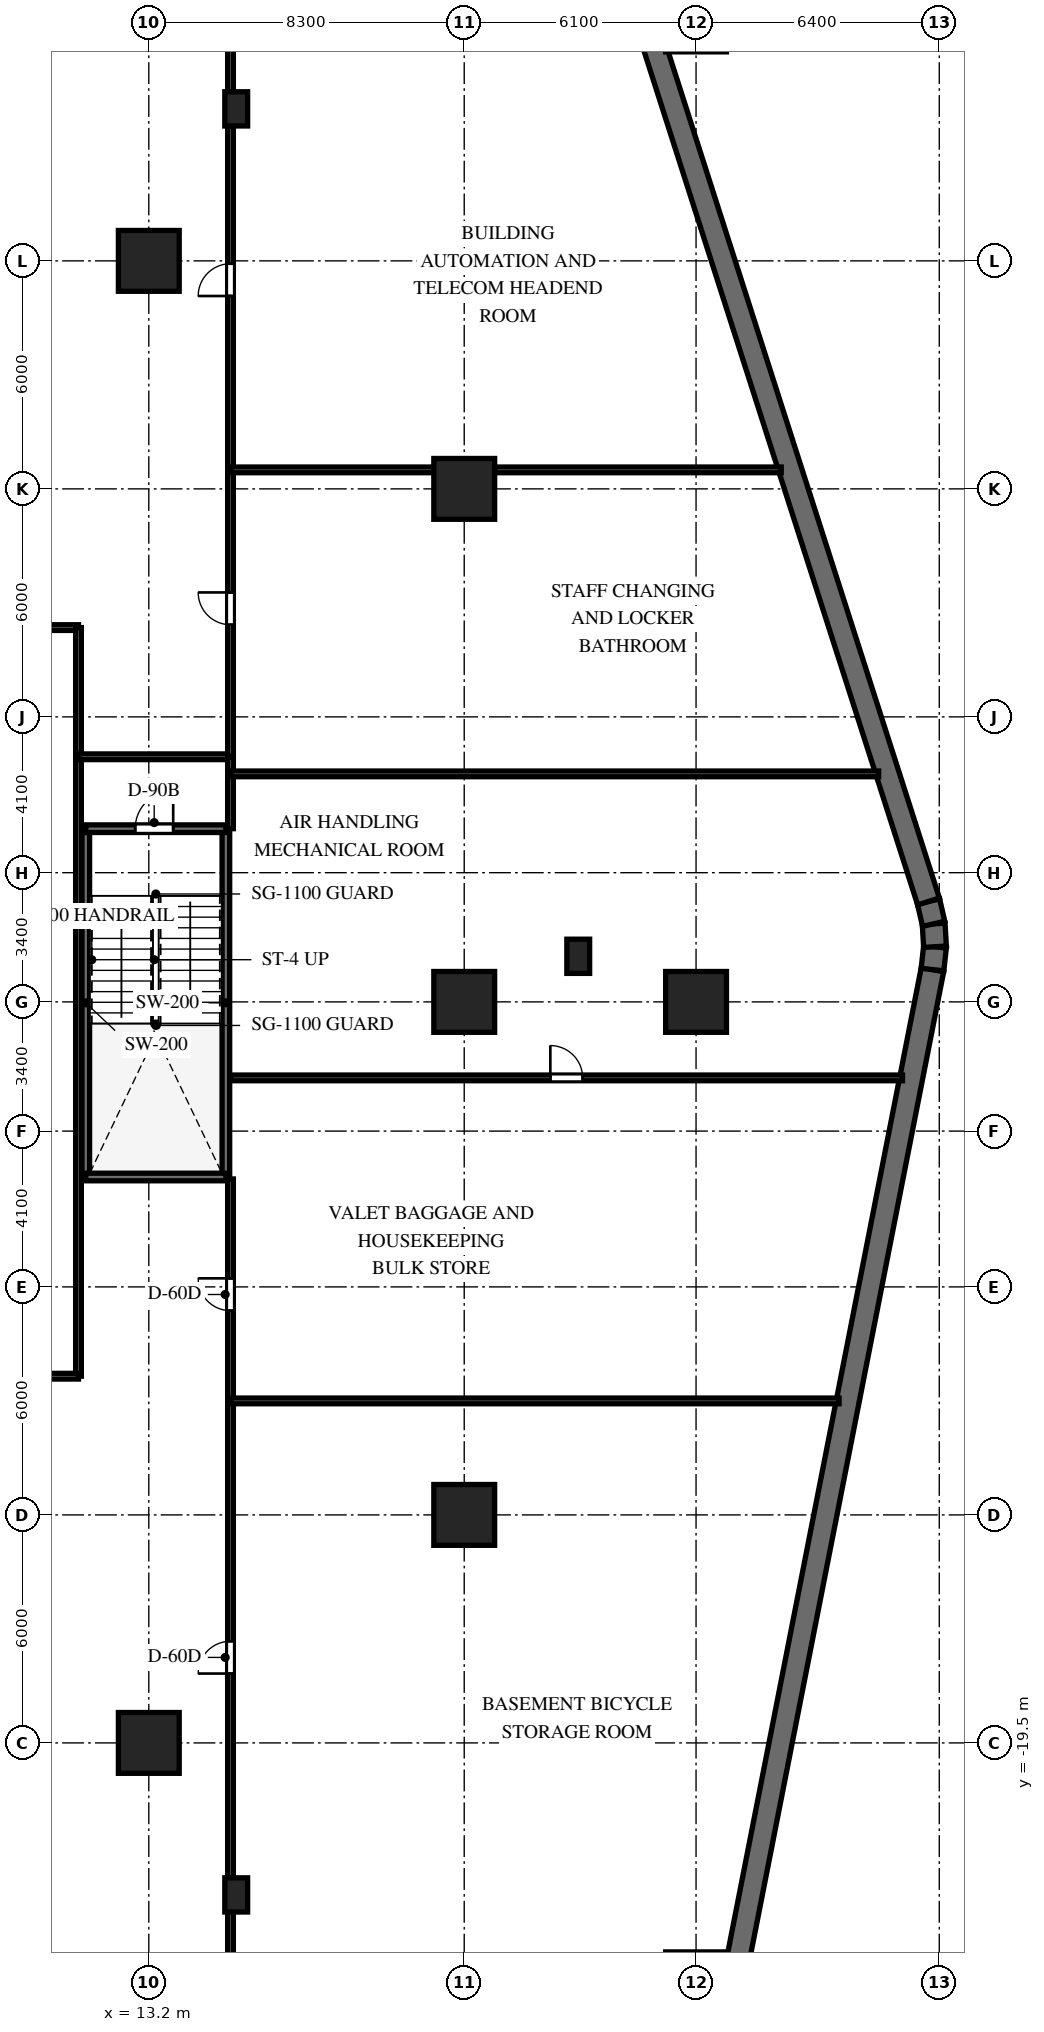
"""IFC4 building model, lengths in metres.
Left out: names, types, materials, properties, quantities, classifications, styles, units other than length and angle.
Written with IfcOpenShell. Run it as: python <this file> out.ifc"""

import sys

from ifc_helpers import new_model, si_unit, direction, frame, frame_2d, origin, origin_2d, place, context, subcontext, project, spatial, rectangle, extrude, element, fill, save


model = new_model("IFC4")
c1 = context("Model", 3, precision=1e-05, world=origin(), true_north=direction((0.0, 1.0)))
c2 = subcontext(c1, "Body", "Model", "MODEL_VIEW")
j1 = project(units=[si_unit("LENGTHUNIT", "METRE"), si_unit("PLANEANGLEUNIT", "RADIAN")], contexts=[c1])
p1 = place(None, origin())
s1 = spatial("IfcSite", under=j1, at=p1, CompositionType="ELEMENT")
p2 = place(p1, origin())
s2 = spatial("IfcBuilding", under=s1, at=p2, CompositionType="ELEMENT")
p3 = place(p2, frame((0.0, 0.0, -4.5)))
s3 = spatial("IfcBuildingStorey", under=s2, at=p3, CompositionType="ELEMENT", Elevation=-4.5)
for number, where, z_axis, x_axis in (
    (1, (11.542, -4.608, 0.0), (0.0, 0.0, 1.0), (0.0, 1.0, 0.0)),
    (2, (15.228, -4.608, 0.0), (0.0, 0.0, 1.0), (0.0, 1.0, 0.0)),
):
    element("IfcWall", number, at=place(p3, frame(where, z_axis=z_axis, x_axis=x_axis)), inside=s3, PredefinedType="SHEAR", context=c2, shape_type="SweptSolid", body=[
        extrude(rectangle(XDim=9.166, YDim=0.2, at=frame_2d((4.583, 0.0))), origin(), (0.0, 0.0, 1.0), 4.5),
    ])
p4 = place(p3, frame((11.542, -4.608, 0.0), z_axis=(0.0, 0.0, 1.0), x_axis=(1.0, 0.0, 0.0)))
e3 = element("IfcWall", 3, at=p4, inside=s3, PredefinedType="SHEAR", context=c2, shape_type="SweptSolid", body=[
    extrude(rectangle(XDim=3.686, YDim=0.2, at=frame_2d((1.843, 0.0))), origin(), (0.0, 0.0, 1.0), 4.5),
])
p5 = place(p3, frame((11.542, 4.558, 0.0), z_axis=(0.0, 0.0, 1.0), x_axis=(1.0, 0.0, 0.0)))
e4 = element("IfcWall", 4, at=p5, inside=s3, PredefinedType="SHEAR", context=c2, shape_type="SweptSolid", body=[
    extrude(rectangle(XDim=3.686, YDim=0.2, at=frame_2d((1.843, 0.0))), origin(), (0.0, 0.0, 1.0), 4.5),
])
p6 = place(p5, frame((1.3, 0.0, 0.0)))
e5 = element("IfcOpeningElement", 5, at=p6, cuts=e4, PredefinedType="OPENING", context=c2, shape_type="SweptSolid", body=[
    extrude(rectangle(XDim=1.0, YDim=2.15, at=frame_2d((0.5, 1.075))), frame((0.0, 0.11, 0.0), z_axis=(0.0, -1.0, 0.0), x_axis=(1.0, 0.0, 0.0)), (0.0, 0.0, 1.0), 0.22),
])
p7 = place(p3, frame((27.941, -29.094, 0.0), z_axis=(0.0, 0.0, 1.0), x_axis=(0.192705549984, 0.981256628515, 0.0)))
e6 = element("IfcWall", 6, at=p7, inside=s3, PredefinedType="SHEAR", context=c2, shape_type="SweptSolid", body=[
    extrude(rectangle(XDim=30.516, YDim=0.6, at=frame_2d((15.258, 0.0))), origin(), (0.0, 0.0, 1.0), 4.5),
])
p8 = place(p3, frame((33.821, 0.85, 0.0), z_axis=(0.0, 0.0, 1.0), x_axis=(0.109899357688, 0.993942720271, 0.0)))
e7 = element("IfcWall", 7, at=p8, inside=s3, PredefinedType="SHEAR", context=c2, shape_type="SweptSolid", body=[
    extrude(rectangle(XDim=0.604, YDim=0.6, at=frame_2d((0.302, 0.0))), origin(), (0.0, 0.0, 1.0), 4.5),
])
for number, where, z_axis, x_axis in (
    (8, (33.888, 1.451, 0.0), (0.0, 0.0, 1.0), (-0.058, 0.998, 0.0)),
    (9, (33.853, 2.054, 0.0), (0.0, 0.0, 1.0), (-0.224, 0.975, 0.0)),
):
    element("IfcWall", number, at=place(p3, frame(where, z_axis=z_axis, x_axis=x_axis)), inside=s3, PredefinedType="SHEAR", context=c2, shape_type="SweptSolid", body=[
        extrude(rectangle(XDim=0.604, YDim=0.6, at=frame_2d((0.302, 0.0))), origin(), (0.0, 0.0, 1.0), 4.5),
    ])
p9 = place(p3, frame((33.717, 2.643, 0.0), z_axis=(0.0, 0.0, 1.0), x_axis=(-0.305147622554, 0.952305060603, 0.0)))
e10 = element("IfcWall", 10, at=p9, inside=s3, PredefinedType="SHEAR", context=c2, shape_type="SweptSolid", body=[
    extrude(rectangle(XDim=28.201, YDim=0.6, at=frame_2d((14.101, 0.0))), origin(), (0.0, 0.0, 1.0), 4.5),
])
for number, where, z_axis, x_axis in (
    (11, (21.5, -13.5, 0.0), (0.0, 0.0, 1.0), (1.0, 0.0, 0.0)),
    (12, (21.5, 0.0, 0.0), (0.0, 0.0, 1.0), (1.0, 0.0, 0.0)),
    (13, (21.5, 13.5, 0.0), (0.0, 0.0, 1.0), (1.0, 0.0, 0.0)),
    (14, (13.2, -19.5, 0.0), (0.0, 0.0, 1.0), (1.0, 0.0, 0.0)),
    (15, (13.2, 19.5, 0.0), (0.0, 0.0, 1.0), (1.0, 0.0, 0.0)),
    (16, (27.6, 0.0, 0.0), (0.0, 0.0, 1.0), (1.0, 0.0, 0.0)),
):
    element("IfcColumn", number, at=place(p3, frame(where, z_axis=z_axis, x_axis=x_axis)), inside=s3, PredefinedType="COLUMN", context=c2, shape_type="SweptSolid", body=[
        extrude(rectangle(XDim=1.6, YDim=1.6, at=origin_2d()), origin(), (0.0, 0.0, 1.0), 4.5),
    ])
for number, where, z_axis, x_axis in (
    (17, (15.5, -23.5, 0.0), (0.0, 0.0, 1.0), (1.0, 0.0, 0.0)),
    (18, (24.5, 1.2, 0.0), (0.0, 0.0, 1.0), (1.0, 0.0, 0.0)),
    (19, (15.5, 23.5, 0.0), (0.0, 0.0, 1.0), (1.0, 0.0, 0.0)),
):
    element("IfcColumn", number, at=place(p3, frame(where, z_axis=z_axis, x_axis=x_axis)), inside=s3, PredefinedType="PILASTER", context=c2, shape_type="SweptSolid", body=[
        extrude(rectangle(XDim=0.6, YDim=0.9, at=origin_2d()), origin(), (0.0, 0.0, 1.0), 4.5),
    ])
p10 = place(p3, frame((-11.35, 9.85, 0.0), z_axis=(0.0, 0.0, 1.0), x_axis=(1.0, 0.0, 0.0)))
e20 = element("IfcWall", 20, at=p10, inside=s3, PredefinedType="PARTITIONING", context=c2, shape_type="SweptSolid", body=[
    extrude(rectangle(XDim=22.7, YDim=0.15, at=frame_2d((11.35, 0.0))), origin(), (0.0, 0.0, 1.0), 3.17),
])
p11 = place(p3, frame((11.35, 9.85, 0.0), z_axis=(0.0, 0.0, 1.0), x_axis=(0.0, -1.0, 0.0)))
e21 = element("IfcWall", 21, at=p11, inside=s3, PredefinedType="PARTITIONING", context=c2, shape_type="SweptSolid", body=[
    extrude(rectangle(XDim=19.7, YDim=0.15, at=frame_2d((9.85, 0.0))), origin(), (0.0, 0.0, 1.0), 3.17),
])
p12 = place(p3, frame((11.35, -9.85, 0.0), z_axis=(0.0, 0.0, 1.0), x_axis=(-1.0, 0.0, 0.0)))
e22 = element("IfcWall", 22, at=p12, inside=s3, PredefinedType="PARTITIONING", context=c2, shape_type="SweptSolid", body=[
    extrude(rectangle(XDim=22.7, YDim=0.15, at=frame_2d((11.35, 0.0))), origin(), (0.0, 0.0, 1.0), 3.17),
])
p13 = place(p3, frame((11.35, 6.45, 0.0), z_axis=(0.0, 0.0, 1.0), x_axis=(1.0, 0.0, 0.0)))
e23 = element("IfcWall", 23, at=p13, inside=s3, PredefinedType="PARTITIONING", context=c2, shape_type="SweptSolid", body=[
    extrude(rectangle(XDim=4.0, YDim=0.15, at=frame_2d((2.0, 0.0))), origin(), (0.0, 0.0, 1.0), 4.18),
])
p14 = place(p3, frame((15.35, 4.558, 0.0), z_axis=(0.0, 0.0, 1.0), x_axis=(0.0, 1.0, 0.0)))
e24 = element("IfcWall", 24, at=p14, inside=s3, PredefinedType="PARTITIONING", context=c2, shape_type="SweptSolid", body=[
    extrude(rectangle(XDim=1.892, YDim=0.15, at=frame_2d((0.946, 0.0))), origin(), (0.0, 0.0, 1.0), 4.18),
])
p15 = place(p3, frame((15.35, -25.5, 0.0), z_axis=(0.0, 0.0, 1.0), x_axis=(0.0, 1.0, 0.0)))
e25 = element("IfcWall", 25, at=p15, inside=s3, PredefinedType="PARTITIONING", context=c2, shape_type="SweptSolid", body=[
    extrude(rectangle(XDim=20.84, YDim=0.15, at=frame_2d((10.42, 0.0))), origin(), (0.0, 0.0, 1.0), 3.17),
])
p16 = place(p15, frame((7.825, 0.0, 0.0)))
e26 = element("IfcOpeningElement", 26, at=p16, cuts=e25, PredefinedType="OPENING", context=c2, shape_type="SweptSolid", body=[
    extrude(rectangle(XDim=0.85, YDim=2.03, at=frame_2d((0.425, 1.015))), frame((0.0, 0.085, 0.0), z_axis=(0.0, -1.0, 0.0), x_axis=(1.0, 0.0, 0.0)), (0.0, 0.0, 1.0), 0.17),
])
p17 = place(p15, frame((17.375, 0.0, 0.0)))
e27 = element("IfcOpeningElement", 27, at=p17, cuts=e25, PredefinedType="OPENING", context=c2, shape_type="SweptSolid", body=[
    extrude(rectangle(XDim=0.85, YDim=2.03, at=frame_2d((0.425, 1.015))), frame((0.0, 0.085, 0.0), z_axis=(0.0, -1.0, 0.0), x_axis=(1.0, 0.0, 0.0)), (0.0, 0.0, 1.0), 0.17),
])
p18 = place(p3, frame((15.35, 6.46, 0.0), z_axis=(0.0, 0.0, 1.0), x_axis=(0.0, 1.0, 0.0)))
e28 = element("IfcWall", 28, at=p18, inside=s3, PredefinedType="PARTITIONING", context=c2, shape_type="SweptSolid", body=[
    extrude(rectangle(XDim=19.04, YDim=0.15, at=frame_2d((9.52, 0.0))), origin(), (0.0, 0.0, 1.0), 3.17),
])
p19 = place(p18, frame((3.465, 0.0, 0.0)))
e29 = element("IfcOpeningElement", 29, at=p19, cuts=e28, PredefinedType="OPENING", context=c2, shape_type="SweptSolid", body=[
    extrude(rectangle(XDim=0.85, YDim=2.03, at=frame_2d((0.425, 1.015))), frame((0.0, 0.085, 0.0), z_axis=(0.0, -1.0, 0.0), x_axis=(1.0, 0.0, 0.0)), (0.0, 0.0, 1.0), 0.17),
])
p20 = place(p18, frame((12.115, 0.0, 0.0)))
e30 = element("IfcOpeningElement", 30, at=p20, cuts=e28, PredefinedType="OPENING", context=c2, shape_type="SweptSolid", body=[
    extrude(rectangle(XDim=0.85, YDim=2.03, at=frame_2d((0.425, 1.015))), frame((0.0, 0.085, 0.0), z_axis=(0.0, -1.0, 0.0), x_axis=(1.0, 0.0, 0.0)), (0.0, 0.0, 1.0), 0.17),
])
p21 = place(p3, frame((15.35, -10.5, 0.0), z_axis=(0.0, 0.0, 1.0), x_axis=(1.0, 0.0, 0.0)))
e31 = element("IfcWall", 31, at=p21, inside=s3, PredefinedType="PARTITIONING", context=c2, shape_type="SweptSolid", body=[
    extrude(rectangle(XDim=16.013, YDim=0.15, at=frame_2d((8.006, 0.0))), origin(), (0.0, 0.0, 1.0), 3.17),
])
p22 = place(p3, frame((15.35, -2.0, 0.0), z_axis=(0.0, 0.0, 1.0), x_axis=(1.0, 0.0, 0.0)))
e32 = element("IfcWall", 32, at=p22, inside=s3, PredefinedType="PARTITIONING", context=c2, shape_type="SweptSolid", body=[
    extrude(rectangle(XDim=17.682, YDim=0.15, at=frame_2d((8.841, 0.0))), origin(), (0.0, 0.0, 1.0), 3.17),
])
p23 = place(p22, frame((8.416, 0.0, 0.0)))
e33 = element("IfcOpeningElement", 33, at=p23, cuts=e32, PredefinedType="OPENING", context=c2, shape_type="SweptSolid", body=[
    extrude(rectangle(XDim=0.85, YDim=2.03, at=frame_2d((0.425, 1.015))), frame((0.0, 0.085, 0.0), z_axis=(0.0, -1.0, 0.0), x_axis=(1.0, 0.0, 0.0)), (0.0, 0.0, 1.0), 0.17),
])
p24 = place(p3, frame((15.35, 6.0, 0.0), z_axis=(0.0, 0.0, 1.0), x_axis=(1.0, 0.0, 0.0)))
e34 = element("IfcWall", 34, at=p24, inside=s3, PredefinedType="PARTITIONING", context=c2, shape_type="SweptSolid", body=[
    extrude(rectangle(XDim=17.055, YDim=0.15, at=frame_2d((8.527, 0.0))), origin(), (0.0, 0.0, 1.0), 3.17),
])
p25 = place(p3, frame((15.35, 14.0, 0.0), z_axis=(0.0, 0.0, 1.0), x_axis=(1.0, 0.0, 0.0)))
e35 = element("IfcWall", 35, at=p25, inside=s3, PredefinedType="PARTITIONING", context=c2, shape_type="SweptSolid", body=[
    extrude(rectangle(XDim=14.491, YDim=0.15, at=frame_2d((7.246, 0.0))), origin(), (0.0, 0.0, 1.0), 3.17),
])
p26 = place(p6, origin())
e36 = element("IfcDoor", 36, at=p26, inside=s3, OperationType="SINGLE_SWING_RIGHT", PredefinedType="DOOR", context=c2, shape_type="SweptSolid", body=[
    extrude(rectangle(XDim=1.0, YDim=2.15, at=frame_2d((0.5, 1.075))), frame((0.0, 0.025, 0.0), z_axis=(0.0, -1.0, 0.0), x_axis=(1.0, 0.0, 0.0)), (0.0, 0.0, 1.0), 0.05),
])
fill(e5, e36)
p27 = place(p16, origin())
e37 = element("IfcDoor", 37, at=p27, inside=s3, OperationType="SINGLE_SWING_LEFT", PredefinedType="DOOR", context=c2, shape_type="SweptSolid", body=[
    extrude(rectangle(XDim=0.85, YDim=2.03, at=frame_2d((0.425, 1.015))), frame((0.0, 0.025, 0.0), z_axis=(0.0, -1.0, 0.0), x_axis=(1.0, 0.0, 0.0)), (0.0, 0.0, 1.0), 0.05),
])
fill(e26, e37)
p28 = place(p17, origin())
e38 = element("IfcDoor", 38, at=p28, inside=s3, OperationType="SINGLE_SWING_RIGHT", PredefinedType="DOOR", context=c2, shape_type="SweptSolid", body=[
    extrude(rectangle(XDim=0.85, YDim=2.03, at=frame_2d((0.425, 1.015))), frame((0.0, 0.025, 0.0), z_axis=(0.0, -1.0, 0.0), x_axis=(1.0, 0.0, 0.0)), (0.0, 0.0, 1.0), 0.05),
])
fill(e27, e38)
p29 = place(p23, origin())
e39 = element("IfcDoor", 39, at=p29, inside=s3, OperationType="SINGLE_SWING_LEFT", PredefinedType="DOOR", context=c2, shape_type="SweptSolid", body=[
    extrude(rectangle(XDim=0.85, YDim=2.03, at=frame_2d((0.425, 1.015))), frame((0.0, 0.025, 0.0), z_axis=(0.0, -1.0, 0.0), x_axis=(1.0, 0.0, 0.0)), (0.0, 0.0, 1.0), 0.05),
])
fill(e33, e39)
p30 = place(p19, origin())
e40 = element("IfcDoor", 40, at=p30, inside=s3, OperationType="SINGLE_SWING_RIGHT", PredefinedType="DOOR", context=c2, shape_type="SweptSolid", body=[
    extrude(rectangle(XDim=0.85, YDim=2.03, at=frame_2d((0.425, 1.015))), frame((0.0, 0.025, 0.0), z_axis=(0.0, -1.0, 0.0), x_axis=(1.0, 0.0, 0.0)), (0.0, 0.0, 1.0), 0.05),
])
fill(e29, e40)
p31 = place(p20, origin())
e41 = element("IfcDoor", 41, at=p31, inside=s3, OperationType="SINGLE_SWING_LEFT", PredefinedType="DOOR", context=c2, shape_type="SweptSolid", body=[
    extrude(rectangle(XDim=0.85, YDim=2.03, at=frame_2d((0.425, 1.015))), frame((0.0, 0.025, 0.0), z_axis=(0.0, -1.0, 0.0), x_axis=(1.0, 0.0, 0.0)), (0.0, 0.0, 1.0), 0.05),
])
fill(e30, e41)
save(model, sys.argv[1])
